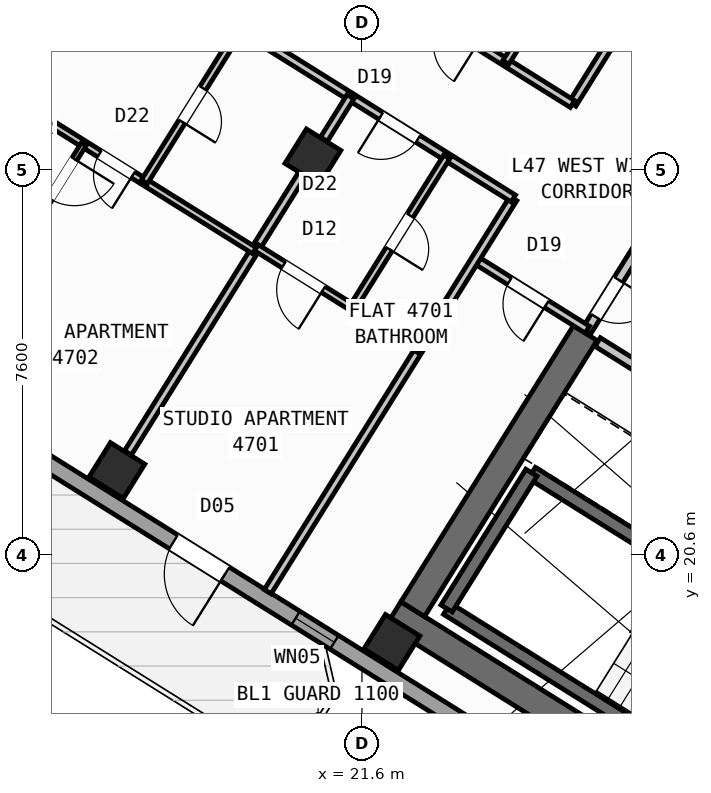
"""IFC4 building model, lengths in metres.
Left out: names, types, materials, properties, quantities, classifications, styles, units other than length and angle.
Written with IfcOpenShell. Run it as: python <this file> out.ifc"""

import sys

from ifc_helpers import new_model, si_unit, direction, frame, frame_2d, origin, origin_2d, place, context, subcontext, project, spatial, rectangle, hollow_rectangle, extrude, source, transform, mapped, element, fill, save


model = new_model("IFC4")
c1 = context("Model", 3, precision=1e-05, world=origin(), true_north=direction((0.0, 1.0)))
c2 = subcontext(c1, "Body", "Model", "MODEL_VIEW")
j1 = project(units=[si_unit("LENGTHUNIT", "METRE"), si_unit("PLANEANGLEUNIT", "RADIAN")], contexts=[c1])
p1 = place(None, origin())
s1 = spatial("IfcSite", under=j1, at=p1, CompositionType="ELEMENT")
p2 = place(p1, origin())
s2 = spatial("IfcBuilding", under=s1, at=p2, CompositionType="ELEMENT")
p3 = place(p2, frame((0.0, 0.0, 187.8)))
s3 = spatial("IfcBuildingStorey", under=s2, at=p3, CompositionType="ELEMENT", Elevation=187.8)
p4 = place(p3, frame((33.366, 12.477, 0.0), z_axis=(0.0, 0.0, 1.0), x_axis=(-0.848047359947, 0.529920442413, 0.0)))
e1 = element("IfcWall", 1, at=p4, inside=s3, PredefinedType="SHEAR", context=c2, shape_type="SweptSolid", body=[
    extrude(rectangle(XDim=13.14, YDim=0.55, at=frame_2d((6.57, 0.0))), origin(), (0.0, 0.0, 1.0), 3.35),
])
p5 = place(p3, frame((26.007, 24.976, 0.0), z_axis=(0.0, 0.0, 1.0), x_axis=(-0.529923795287, -0.848045264823, 0.0)))
e2 = element("IfcWall", 2, at=p5, inside=s3, PredefinedType="SHEAR", context=c2, shape_type="SweptSolid", body=[
    extrude(rectangle(XDim=6.425, YDim=0.55, at=frame_2d((3.212, 0.0))), origin(), (0.0, 0.0, 1.0), 3.35),
])
m1 = source(origin(), c2, "Body", "SweptSolid", [
    extrude(hollow_rectangle(XDim=0.8, YDim=0.8, WallThickness=0.032, at=origin_2d()), origin(), (0.0, 0.0, 1.0), 3.6),
])
for number, where, z_axis, x_axis in (
    (3, (22.191, 18.87, 0.0), (0.0, 0.0, 1.0), (-0.848, 0.53, 0.0)),
    (4, (20.632, 28.452, 0.0), (0.0, 0.0, 1.0), (-0.848, 0.53, 0.0)),
    (5, (16.764, 22.261, 0.0), (0.0, 0.0, 1.0), (-0.848, 0.53, 0.0)),
):
    element("IfcColumn", number, at=place(p3, frame(where, z_axis=z_axis, x_axis=x_axis)), inside=s3, PredefinedType="COLUMN", context=c2, shape_type="MappedRepresentation", body=[
        mapped(m1, transform((0.0, 0.0, 0.0), scale=1.0)),
    ])
p6 = place(p3, frame((31.76, 12.183, 0.0), z_axis=(0.0, 0.0, 1.0), x_axis=(-0.848047074256, 0.529920899612, 0.0)))
e6 = element("IfcWall", 6, at=p6, inside=s3, PredefinedType="STANDARD", context=c2, shape_type="SweptSolid", body=[
    extrude(rectangle(XDim=30.652, YDim=0.32, at=frame_2d((15.326, 0.0))), origin(), (0.0, 0.0, 1.0), 3.35),
])
p7 = place(p6, frame((15.166, 0.0, 0.0)))
e7 = element("IfcOpeningElement", 7, at=p7, cuts=e6, PredefinedType="OPENING", context=c2, shape_type="SweptSolid", body=[
    extrude(rectangle(XDim=1.2, YDim=2.15, at=frame_2d((0.6, 1.075))), frame((0.0, 0.17, 0.0), z_axis=(0.0, -1.0, 0.0), x_axis=(1.0, 0.0, 0.0)), (0.0, 0.0, 1.0), 0.34),
])
p8 = place(p6, frame((2.015, 0.0, 0.8)))
e8 = element("IfcOpeningElement", 8, at=p8, cuts=e6, PredefinedType="OPENING", context=c2, shape_type="SweptSolid", body=[
    extrude(rectangle(XDim=2.1, YDim=1.55, at=frame_2d((1.05, 0.775))), frame((0.0, 0.17, 0.0), z_axis=(0.0, -1.0, 0.0), x_axis=(1.0, 0.0, 0.0)), (0.0, 0.0, 1.0), 0.34),
])
p9 = place(p6, frame((7.244, 0.0, 0.8)))
e9 = element("IfcOpeningElement", 9, at=p9, cuts=e6, PredefinedType="OPENING", context=c2, shape_type="SweptSolid", body=[
    extrude(rectangle(XDim=2.1, YDim=1.55, at=frame_2d((1.05, 0.775))), frame((0.0, 0.17, 0.0), z_axis=(0.0, -1.0, 0.0), x_axis=(1.0, 0.0, 0.0)), (0.0, 0.0, 1.0), 0.34),
])
p10 = place(p6, frame((12.623, 0.0, 1.0)))
e10 = element("IfcOpeningElement", 10, at=p10, cuts=e6, PredefinedType="OPENING", context=c2, shape_type="SweptSolid", body=[
    extrude(rectangle(XDim=0.9, YDim=1.25, at=frame_2d((0.45, 0.625))), frame((0.0, 0.17, 0.0), z_axis=(0.0, -1.0, 0.0), x_axis=(1.0, 0.0, 0.0)), (0.0, 0.0, 1.0), 0.34),
])
p11 = place(p6, frame((19.565, 0.0, 0.95)))
e11 = element("IfcOpeningElement", 11, at=p11, cuts=e6, PredefinedType="OPENING", context=c2, shape_type="SweptSolid", body=[
    extrude(rectangle(XDim=1.2, YDim=1.4, at=frame_2d((0.6, 0.7))), frame((0.0, 0.17, 0.0), z_axis=(0.0, -1.0, 0.0), x_axis=(1.0, 0.0, 0.0)), (0.0, 0.0, 1.0), 0.34),
])
p12 = place(p6, frame((25.983, 0.0, 1.0)))
e12 = element("IfcOpeningElement", 12, at=p12, cuts=e6, PredefinedType="OPENING", context=c2, shape_type="SweptSolid", body=[
    extrude(rectangle(XDim=0.9, YDim=1.25, at=frame_2d((0.45, 0.625))), frame((0.0, 0.17, 0.0), z_axis=(0.0, -1.0, 0.0), x_axis=(1.0, 0.0, 0.0)), (0.0, 0.0, 1.0), 0.34),
])
p13 = place(p6, frame((28.433, 0.0, 1.0)))
e13 = element("IfcOpeningElement", 13, at=p13, cuts=e6, PredefinedType="OPENING", context=c2, shape_type="SweptSolid", body=[
    extrude(rectangle(XDim=0.9, YDim=1.25, at=frame_2d((0.45, 0.625))), frame((0.0, 0.17, 0.0), z_axis=(0.0, -1.0, 0.0), x_axis=(1.0, 0.0, 0.0)), (0.0, 0.0, 1.0), 0.34),
])
p14 = place(p3, frame((5.7, 28.71, 0.0), z_axis=(0.0, 0.0, 1.0), x_axis=(0.529923711467, 0.8480453172, 0.0)))
e14 = element("IfcWall", 14, at=p14, inside=s3, PredefinedType="STANDARD", context=c2, shape_type="SweptSolid", body=[
    extrude(rectangle(XDim=21.587, YDim=0.32, at=frame_2d((10.794, 0.0))), origin(), (0.0, 0.0, 1.0), 2.825),
])
p15 = place(p14, frame((1.44, 0.0, 0.95)))
e15 = element("IfcOpeningElement", 15, at=p15, cuts=e14, PredefinedType="OPENING", context=c2, shape_type="SweptSolid", body=[
    extrude(rectangle(XDim=1.2, YDim=1.4, at=frame_2d((0.6, 0.7))), frame((0.0, 0.17, 0.0), z_axis=(0.0, -1.0, 0.0), x_axis=(1.0, 0.0, 0.0)), (0.0, 0.0, 1.0), 0.34),
])
p16 = place(p14, frame((4.545, 0.0, 0.85)))
e16 = element("IfcOpeningElement", 16, at=p16, cuts=e14, PredefinedType="OPENING", context=c2, shape_type="SweptSolid", body=[
    extrude(rectangle(XDim=1.8, YDim=1.5, at=frame_2d((0.9, 0.75))), frame((0.0, 0.17, 0.0), z_axis=(0.0, -1.0, 0.0), x_axis=(1.0, 0.0, 0.0)), (0.0, 0.0, 1.0), 0.34),
])
p17 = place(p14, frame((12.139, 0.0, 1.0)))
e17 = element("IfcOpeningElement", 17, at=p17, cuts=e14, PredefinedType="OPENING", context=c2, shape_type="SweptSolid", body=[
    extrude(rectangle(XDim=0.9, YDim=1.25, at=frame_2d((0.45, 0.625))), frame((0.0, 0.17, 0.0), z_axis=(0.0, -1.0, 0.0), x_axis=(1.0, 0.0, 0.0)), (0.0, 0.0, 1.0), 0.34),
])
p18 = place(p14, frame((16.35, 0.0, 0.95)))
e18 = element("IfcOpeningElement", 18, at=p18, cuts=e14, PredefinedType="OPENING", context=c2, shape_type="SweptSolid", body=[
    extrude(rectangle(XDim=1.2, YDim=1.4, at=frame_2d((0.6, 0.7))), frame((0.0, 0.17, 0.0), z_axis=(0.0, -1.0, 0.0), x_axis=(1.0, 0.0, 0.0)), (0.0, 0.0, 1.0), 0.34),
])
p19 = place(p14, frame((18.762, 0.0, 0.95)))
e19 = element("IfcOpeningElement", 19, at=p19, cuts=e14, PredefinedType="OPENING", context=c2, shape_type="SweptSolid", body=[
    extrude(rectangle(XDim=1.2, YDim=1.4, at=frame_2d((0.6, 0.7))), frame((0.0, 0.17, 0.0), z_axis=(0.0, -1.0, 0.0), x_axis=(1.0, 0.0, 0.0)), (0.0, 0.0, 1.0), 0.34),
])
p20 = place(p3, frame((29.605, 15.581, 0.0), z_axis=(0.0, 0.0, 1.0), x_axis=(-0.848036911448, 0.529937163087, 0.0)))
e20 = element("IfcWall", 20, at=p20, inside=s3, PredefinedType="SHEAR", context=c2, shape_type="SweptSolid", body=[
    extrude(rectangle(XDim=7.46, YDim=0.26, at=frame_2d((3.73, 0.0))), origin(), (0.0, 0.0, 1.0), 3.35),
])
p21 = place(p3, frame((31.28, 18.261, 0.0), z_axis=(0.0, 0.0, 1.0), x_axis=(-0.848051618787, 0.529913626805, 0.0)))
e21 = element("IfcWall", 21, at=p21, inside=s3, PredefinedType="SHEAR", context=c2, shape_type="SweptSolid", body=[
    extrude(rectangle(XDim=7.46, YDim=0.26, at=frame_2d((3.73, 0.0))), origin(), (0.0, 0.0, 1.0), 3.35),
])
p22 = place(p21, frame((0.36, 0.0, 0.0)))
e22 = element("IfcOpeningElement", 22, at=p22, cuts=e21, PredefinedType="OPENING", context=c2, shape_type="SweptSolid", body=[
    extrude(rectangle(XDim=0.86, YDim=2.05, at=frame_2d((0.43, 1.025))), frame((0.0, 0.14, 0.0), z_axis=(0.0, -1.0, 0.0), x_axis=(1.0, 0.0, 0.0)), (0.0, 0.0, 1.0), 0.28),
])
p23 = place(p3, frame((24.945, 22.22, 0.0), z_axis=(0.0, 0.0, 1.0), x_axis=(-0.529908658664, -0.84805472316, 0.0)))
e23 = element("IfcWall", 23, at=p23, inside=s3, PredefinedType="SHEAR", context=c2, shape_type="SweptSolid", body=[
    extrude(rectangle(XDim=3.16, YDim=0.26, at=frame_2d((1.58, 0.0))), origin(), (0.0, 0.0, 1.0), 3.35),
])
p24 = place(p3, frame((31.525, 21.504, 0.0), z_axis=(0.0, 0.0, 1.0), x_axis=(-0.848040211232, 0.529931882541, 0.0)))
e24 = element("IfcWall", 24, at=p24, inside=s3, PredefinedType="STANDARD", context=c2, shape_type="SweptSolid", body=[
    extrude(rectangle(XDim=6.218, YDim=0.2, at=frame_2d((3.109, 0.0))), origin(), (0.0, 0.0, 1.0), 3.34),
])
p25 = place(p24, frame((4.4, 0.0, 0.0)))
e25 = element("IfcOpeningElement", 25, at=p25, cuts=e24, PredefinedType="OPENING", context=c2, shape_type="SweptSolid", body=[
    extrude(rectangle(XDim=0.86, YDim=2.05, at=frame_2d((0.43, 1.025))), frame((0.0, 0.11, 0.0), z_axis=(0.0, -1.0, 0.0), x_axis=(1.0, 0.0, 0.0)), (0.0, 0.0, 1.0), 0.22),
])
p26 = place(p24, frame((1.45, 0.0, 0.0)))
e26 = element("IfcOpeningElement", 26, at=p26, cuts=e24, PredefinedType="OPENING", context=c2, shape_type="SweptSolid", body=[
    extrude(rectangle(XDim=0.86, YDim=2.05, at=frame_2d((0.43, 1.025))), frame((0.0, 0.11, 0.0), z_axis=(0.0, -1.0, 0.0), x_axis=(1.0, 0.0, 0.0)), (0.0, 0.0, 1.0), 0.22),
])
p27 = place(p3, frame((27.596, 27.52, 0.0), z_axis=(0.0, 0.0, 1.0), x_axis=(-0.529865479138, -0.848081702443, 0.0)))
e27 = element("IfcWall", 27, at=p27, inside=s3, PredefinedType="STANDARD", context=c2, shape_type="SweptSolid", body=[
    extrude(rectangle(XDim=2.96, YDim=0.2, at=frame_2d((1.48, 0.0))), origin(), (0.0, 0.0, 1.0), 3.34),
])
p28 = place(p27, frame((1.76, 0.0, 0.0)))
e28 = element("IfcOpeningElement", 28, at=p28, cuts=e27, PredefinedType="OPENING", context=c2, shape_type="SweptSolid", body=[
    extrude(rectangle(XDim=0.86, YDim=2.05, at=frame_2d((0.43, 1.025))), frame((0.0, 0.11, 0.0), z_axis=(0.0, -1.0, 0.0), x_axis=(1.0, 0.0, 0.0)), (0.0, 0.0, 1.0), 0.22),
])
p29 = place(p3, frame((26.049, 25.044, 0.0), z_axis=(0.0, 0.0, 1.0), x_axis=(-0.848050851465, 0.529914854792, 0.0)))
e29 = element("IfcWall", 29, at=p29, inside=s3, PredefinedType="PARTITIONING", context=c2, shape_type="SweptSolid", body=[
    extrude(rectangle(XDim=2.61, YDim=0.16, at=frame_2d((1.305, 0.0))), origin(), (0.0, 0.0, 1.0), 2.825),
])
p30 = place(p29, frame((0.95, 0.0, 0.0)))
e30 = element("IfcOpeningElement", 30, at=p30, cuts=e29, PredefinedType="OPENING", context=c2, shape_type="SweptSolid", body=[
    extrude(rectangle(XDim=0.86, YDim=2.05, at=frame_2d((0.43, 1.025))), frame((0.0, 0.09, 0.0), z_axis=(0.0, -1.0, 0.0), x_axis=(1.0, 0.0, 0.0)), (0.0, 0.0, 1.0), 0.18),
])
p31 = place(p3, frame((31.239, 38.274, 0.0), z_axis=(0.0, 0.0, 1.0), x_axis=(-0.529914125013, -0.848051307476, 0.0)))
e31 = element("IfcWall", 31, at=p31, inside=s3, PredefinedType="PARTITIONING", context=c2, shape_type="SweptSolid", body=[
    extrude(rectangle(XDim=10.35, YDim=0.16, at=frame_2d((5.175, 0.0))), origin(), (0.0, 0.0, 1.0), 3.34),
])
p32 = place(p3, frame((24.588, 27.631, 0.0), z_axis=(0.0, 0.0, 1.0), x_axis=(-0.529914992377, -0.848050765494, 0.0)))
e32 = element("IfcWall", 32, at=p32, inside=s3, PredefinedType="PARTITIONING", context=c2, shape_type="SweptSolid", body=[
    extrude(rectangle(XDim=9.15, YDim=0.16, at=frame_2d((4.575, 0.0))), origin(), (0.0, 0.0, 1.0), 3.34),
])
p33 = place(p3, frame((25.754, 29.497, 0.0), z_axis=(0.0, 0.0, 1.0), x_axis=(-0.848045850158, 0.529922858565, 0.0)))
e33 = element("IfcWall", 33, at=p33, inside=s3, PredefinedType="PARTITIONING", context=c2, shape_type="SweptSolid", body=[
    extrude(rectangle(XDim=16.73, YDim=0.16, at=frame_2d((8.365, 0.0))), origin(), (0.0, 0.0, 1.0), 3.34),
])
p34 = place(p33, frame((2.22, 0.0, 0.0)))
e34 = element("IfcOpeningElement", 34, at=p34, cuts=e33, PredefinedType="OPENING", context=c2, shape_type="SweptSolid", body=[
    extrude(rectangle(XDim=0.86, YDim=2.05, at=frame_2d((0.43, 1.025))), frame((0.0, 0.09, 0.0), z_axis=(0.0, -1.0, 0.0), x_axis=(1.0, 0.0, 0.0)), (0.0, 0.0, 1.0), 0.18),
])
p35 = place(p33, frame((6.49, 0.0, 0.0)))
e35 = element("IfcOpeningElement", 35, at=p35, cuts=e33, PredefinedType="OPENING", context=c2, shape_type="SweptSolid", body=[
    extrude(rectangle(XDim=1.0, YDim=2.1, at=frame_2d((0.5, 1.05))), frame((0.0, 0.09, 0.0), z_axis=(0.0, -1.0, 0.0), x_axis=(1.0, 0.0, 0.0)), (0.0, 0.0, 1.0), 0.18),
])
p36 = place(p33, frame((14.304, 0.0, 0.0)))
e36 = element("IfcOpeningElement", 36, at=p36, cuts=e33, PredefinedType="OPENING", context=c2, shape_type="SweptSolid", body=[
    extrude(rectangle(XDim=1.0, YDim=2.1, at=frame_2d((0.5, 1.05))), frame((0.0, 0.09, 0.0), z_axis=(0.0, -1.0, 0.0), x_axis=(1.0, 0.0, 0.0)), (0.0, 0.0, 1.0), 0.18),
])
p37 = place(p3, frame((24.588, 27.631, 0.0), z_axis=(0.0, 0.0, 1.0), x_axis=(-0.848041752158, 0.529929416617, 0.0)))
e37 = element("IfcWall", 37, at=p37, inside=s3, PredefinedType="PARTITIONING", context=c2, shape_type="SweptSolid", body=[
    extrude(rectangle(XDim=16.73, YDim=0.16, at=frame_2d((8.365, 0.0))), origin(), (0.0, 0.0, 1.0), 3.34),
])
p38 = place(p37, frame((2.22, 0.0, 0.0)))
e38 = element("IfcOpeningElement", 38, at=p38, cuts=e37, PredefinedType="OPENING", context=c2, shape_type="SweptSolid", body=[
    extrude(rectangle(XDim=0.86, YDim=2.05, at=frame_2d((0.43, 1.025))), frame((0.0, 0.09, 0.0), z_axis=(0.0, -1.0, 0.0), x_axis=(1.0, 0.0, 0.0)), (0.0, 0.0, 1.0), 0.18),
])
p39 = place(p37, frame((7.82, 0.0, 0.0)))
e39 = element("IfcOpeningElement", 39, at=p39, cuts=e37, PredefinedType="OPENING", context=c2, shape_type="SweptSolid", body=[
    extrude(rectangle(XDim=1.0, YDim=2.1, at=frame_2d((0.5, 1.05))), frame((0.0, 0.09, 0.0), z_axis=(0.0, -1.0, 0.0), x_axis=(1.0, 0.0, 0.0)), (0.0, 0.0, 1.0), 0.18),
])
p40 = place(p37, frame((12.95, 0.0, 0.0)))
e40 = element("IfcOpeningElement", 40, at=p40, cuts=e37, PredefinedType="OPENING", context=c2, shape_type="SweptSolid", body=[
    extrude(rectangle(XDim=1.0, YDim=2.1, at=frame_2d((0.5, 1.05))), frame((0.0, 0.09, 0.0), z_axis=(0.0, -1.0, 0.0), x_axis=(1.0, 0.0, 0.0)), (0.0, 0.0, 1.0), 0.18),
])
p41 = place(p3, frame((21.374, 29.639, 0.0), z_axis=(0.0, 0.0, 1.0), x_axis=(-0.529998940003, -0.847998304005, 0.0)))
e41 = element("IfcWall", 41, at=p41, inside=s3, PredefinedType="PARTITIONING", context=c2, shape_type="SweptSolid", body=[
    extrude(rectangle(XDim=0.988, YDim=0.16, at=frame_2d((0.494, 0.0))), origin(), (0.0, 0.0, 1.0), 2.825),
])
p42 = place(p3, frame((20.414, 28.103, 0.0), z_axis=(0.0, 0.0, 1.0), x_axis=(-0.529934553702, -0.848038542045, 0.0)))
e42 = element("IfcWall", 42, at=p42, inside=s3, PredefinedType="PARTITIONING", context=c2, shape_type="SweptSolid", body=[
    extrude(rectangle(XDim=6.476, YDim=0.16, at=frame_2d((3.238, 0.0))), origin(), (0.0, 0.0, 1.0), 2.825),
])
p43 = place(p3, frame((22.728, 24.654, 0.0), z_axis=(0.0, 0.0, 1.0), x_axis=(-0.848059820872, 0.529900500304, 0.0)))
e43 = element("IfcWall", 43, at=p43, inside=s3, PredefinedType="PLUMBINGWALL", context=c2, shape_type="SweptSolid", body=[
    extrude(rectangle(XDim=3.79, YDim=0.14, at=frame_2d((1.895, 0.0))), origin(), (0.0, 0.0, 1.0), 3.34),
])
p44 = place(p43, frame((2.23, 0.0, 0.0)))
e44 = element("IfcOpeningElement", 44, at=p44, cuts=e43, PredefinedType="OPENING", context=c2, shape_type="SweptSolid", body=[
    extrude(rectangle(XDim=0.92, YDim=2.08, at=frame_2d((0.46, 1.04))), frame((0.0, 0.08, 0.0), z_axis=(0.0, -1.0, 0.0), x_axis=(1.0, 0.0, 0.0)), (0.0, 0.0, 1.0), 0.16),
])
p45 = place(p3, frame((23.273, 28.452, 0.0), z_axis=(0.0, 0.0, 1.0), x_axis=(-0.529867639402, -0.848080352747, 0.0)))
e45 = element("IfcWall", 45, at=p45, inside=s3, PredefinedType="PLUMBINGWALL", context=c2, shape_type="SweptSolid", body=[
    extrude(rectangle(XDim=3.51, YDim=0.14, at=frame_2d((1.755, 0.0))), origin(), (0.0, 0.0, 1.0), 2.995),
])
p46 = place(p45, frame((1.365, 0.0, 0.0)))
e46 = element("IfcOpeningElement", 46, at=p46, cuts=e45, PredefinedType="OPENING", context=c2, shape_type="SweptSolid", body=[
    extrude(rectangle(XDim=0.78, YDim=2.05, at=frame_2d((0.39, 1.025))), frame((0.0, 0.08, 0.0), z_axis=(0.0, -1.0, 0.0), x_axis=(1.0, 0.0, 0.0)), (0.0, 0.0, 1.0), 0.16),
])
p47 = place(p3, frame((19.477, 26.603, 0.0), z_axis=(0.0, 0.0, 1.0), x_axis=(-0.848039019877, 0.529933789039, 0.0)))
e47 = element("IfcWall", 47, at=p47, inside=s3, PredefinedType="PLUMBINGWALL", context=c2, shape_type="SweptSolid", body=[
    extrude(rectangle(XDim=6.4, YDim=0.14, at=frame_2d((3.2, 0.0))), origin(), (0.0, 0.0, 1.0), 3.34),
])
p48 = place(p47, frame((2.824, 0.0, 0.0)))
e48 = element("IfcOpeningElement", 48, at=p48, cuts=e47, PredefinedType="OPENING", context=c2, shape_type="SweptSolid", body=[
    extrude(rectangle(XDim=0.78, YDim=2.05, at=frame_2d((0.39, 1.025))), frame((0.0, 0.08, 0.0), z_axis=(0.0, -1.0, 0.0), x_axis=(1.0, 0.0, 0.0)), (0.0, 0.0, 1.0), 0.16),
])
p49 = place(p3, frame((19.203, 30.996, 0.0), z_axis=(0.0, 0.0, 1.0), x_axis=(-0.529906983049, -0.848055770169, 0.0)))
e49 = element("IfcWall", 49, at=p49, inside=s3, PredefinedType="PLUMBINGWALL", context=c2, shape_type="SweptSolid", body=[
    extrude(rectangle(XDim=3.58, YDim=0.14, at=frame_2d((1.79, 0.0))), origin(), (0.0, 0.0, 1.0), 3.34),
])
p50 = place(p49, frame((1.4, 0.0, 0.0)))
e50 = element("IfcOpeningElement", 50, at=p50, cuts=e49, PredefinedType="OPENING", context=c2, shape_type="SweptSolid", body=[
    extrude(rectangle(XDim=0.78, YDim=2.05, at=frame_2d((0.39, 1.025))), frame((0.0, 0.08, 0.0), z_axis=(0.0, -1.0, 0.0), x_axis=(1.0, 0.0, 0.0)), (0.0, 0.0, 1.0), 0.16),
])
p51 = place(p3, frame((16.112, 28.706, 0.0), z_axis=(0.0, 0.0, 1.0), x_axis=(-0.529916267533, -0.848049968695, 0.0)))
e51 = element("IfcWall", 51, at=p51, inside=s3, PredefinedType="PARTITIONING", context=c2, shape_type="SweptSolid", body=[
    extrude(rectangle(XDim=5.84, YDim=0.11, at=frame_2d((2.92, 0.0))), origin(), (0.0, 0.0, 1.0), 3.34),
])
p52 = place(p51, frame((0.35, 0.0, 0.0)))
e52 = element("IfcOpeningElement", 52, at=p52, cuts=e51, PredefinedType="OPENING", context=c2, shape_type="SweptSolid", body=[
    extrude(rectangle(XDim=0.92, YDim=2.08, at=frame_2d((0.46, 1.04))), frame((0.0, 0.065, 0.0), z_axis=(0.0, -1.0, 0.0), x_axis=(1.0, 0.0, 0.0)), (0.0, 0.0, 1.0), 0.13),
])
p53 = place(p3, frame((27.359, 34.991, 0.0), z_axis=(0.0, 0.0, 1.0), x_axis=(-0.529907329021, -0.848055553988, 0.0)))
e53 = element("IfcWall", 53, at=p53, inside=s3, PredefinedType="PLUMBINGWALL", context=c2, shape_type="SweptSolid", body=[
    extrude(rectangle(XDim=5.51, YDim=0.14, at=frame_2d((2.755, 0.0))), origin(), (0.0, 0.0, 1.0), 2.995),
])
p54 = place(p53, frame((2.365, 0.0, 0.0)))
e54 = element("IfcOpeningElement", 54, at=p54, cuts=e53, PredefinedType="OPENING", context=c2, shape_type="SweptSolid", body=[
    extrude(rectangle(XDim=0.78, YDim=2.05, at=frame_2d((0.39, 1.025))), frame((0.0, 0.08, 0.0), z_axis=(0.0, -1.0, 0.0), x_axis=(1.0, 0.0, 0.0)), (0.0, 0.0, 1.0), 0.16),
])
m2 = source(origin(), c2, "Body", "SweptSolid", [
    extrude(rectangle(XDim=1.2, YDim=2.15, at=frame_2d((0.6, 1.075))), frame((0.0, 0.025, 0.0), z_axis=(0.0, -1.0, 0.0), x_axis=(1.0, 0.0, 0.0)), (0.0, 0.0, 1.0), 0.05),
])
p55 = place(p7, origin())
e55 = element("IfcDoor", 55, at=p55, inside=s3, OperationType="SINGLE_SWING_LEFT", PredefinedType="DOOR", context=c2, shape_type="MappedRepresentation", body=[
    mapped(m2, transform((0.0, 0.0, 0.0), scale=1.0)),
])
fill(e7, e55)
m3 = source(origin(), c2, "Body", "SweptSolid", [
    extrude(rectangle(XDim=0.9, YDim=1.25, at=frame_2d((0.45, 0.625))), frame((0.0, 0.03, 0.0), z_axis=(0.0, -1.0, 0.0), x_axis=(1.0, 0.0, 0.0)), (0.0, 0.0, 1.0), 0.06),
])
p56 = place(p10, origin())
e56 = element("IfcWindow", 56, at=p56, inside=s3, PartitioningType="SINGLE_PANEL", PredefinedType="WINDOW", context=c2, shape_type="MappedRepresentation", body=[
    mapped(m3, transform((0.0, 0.0, 0.0), scale=1.0)),
])
fill(e10, e56)
m4 = source(origin(), c2, "Body", "SweptSolid", [
    extrude(rectangle(XDim=0.86, YDim=2.05, at=frame_2d((0.43, 1.025))), frame((0.0, 0.025, 0.0), z_axis=(0.0, -1.0, 0.0), x_axis=(1.0, 0.0, 0.0)), (0.0, 0.0, 1.0), 0.05),
])
p57 = place(p30, origin())
e57 = element("IfcDoor", 57, at=p57, inside=s3, OperationType="SINGLE_SWING_LEFT", PredefinedType="DOOR", context=c2, shape_type="MappedRepresentation", body=[
    mapped(m4, transform((0.0, 0.0, 0.0), scale=1.0)),
])
fill(e30, e57)
p58 = place(p28, origin())
e58 = element("IfcDoor", 58, at=p58, inside=s3, OperationType="SINGLE_SWING_LEFT", PredefinedType="DOOR", context=c2, shape_type="MappedRepresentation", body=[
    mapped(m4, transform((0.0, 0.0, 0.0), scale=1.0)),
])
fill(e28, e58)
p59 = place(p38, origin())
e59 = element("IfcDoor", 59, at=p59, inside=s3, OperationType="SINGLE_SWING_RIGHT", PredefinedType="DOOR", context=c2, shape_type="MappedRepresentation", body=[
    mapped(m4, transform((0.0, 0.0, 0.0), scale=1.0)),
])
fill(e38, e59)
m5 = source(origin(), c2, "Body", "SweptSolid", [
    extrude(rectangle(XDim=0.92, YDim=2.08, at=frame_2d((0.46, 1.04))), frame((0.0, 0.025, 0.0), z_axis=(0.0, -1.0, 0.0), x_axis=(1.0, 0.0, 0.0)), (0.0, 0.0, 1.0), 0.05),
])
p60 = place(p44, origin())
e60 = element("IfcDoor", 60, at=p60, inside=s3, OperationType="SINGLE_SWING_LEFT", PredefinedType="DOOR", context=c2, shape_type="MappedRepresentation", body=[
    mapped(m5, transform((0.0, 0.0, 0.0), scale=1.0)),
])
fill(e44, e60)
m6 = source(origin(), c2, "Body", "SweptSolid", [
    extrude(rectangle(XDim=0.78, YDim=2.05, at=frame_2d((0.39, 1.025))), frame((0.0, 0.025, 0.0), z_axis=(0.0, -1.0, 0.0), x_axis=(1.0, 0.0, 0.0)), (0.0, 0.0, 1.0), 0.05),
])
p61 = place(p46, origin())
e61 = element("IfcDoor", 61, at=p61, inside=s3, OperationType="SINGLE_SWING_RIGHT", PredefinedType="DOOR", context=c2, shape_type="MappedRepresentation", body=[
    mapped(m6, transform((0.0, 0.0, 0.0), scale=1.0)),
])
fill(e46, e61)
p62 = place(p52, origin())
e62 = element("IfcDoor", 62, at=p62, inside=s3, OperationType="SINGLE_SWING_LEFT", PredefinedType="DOOR", context=c2, shape_type="MappedRepresentation", body=[
    mapped(m5, transform((0.0, 0.0, 0.0), scale=1.0)),
])
fill(e52, e62)
p63 = place(p48, origin())
e63 = element("IfcDoor", 63, at=p63, inside=s3, OperationType="SINGLE_SWING_LEFT", PredefinedType="DOOR", context=c2, shape_type="MappedRepresentation", body=[
    mapped(m6, transform((0.0, 0.0, 0.0), scale=1.0)),
])
fill(e48, e63)
p64 = place(p50, origin())
e64 = element("IfcDoor", 64, at=p64, inside=s3, OperationType="SINGLE_SWING_RIGHT", PredefinedType="DOOR", context=c2, shape_type="MappedRepresentation", body=[
    mapped(m6, transform((0.0, 0.0, 0.0), scale=1.0)),
])
fill(e50, e64)
save(model, sys.argv[1])
